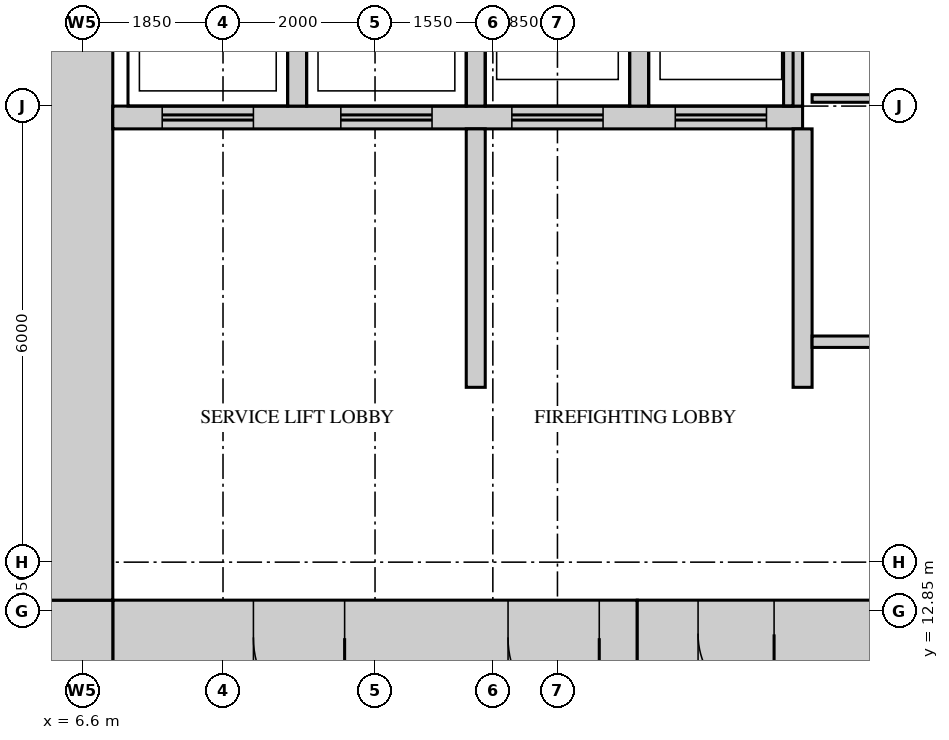
"""IFC4 building model, lengths in metres.
Left out: names, types, materials, properties, quantities, classifications, styles, units other than length and angle.
Written with IfcOpenShell. Run it as: python <this file> out.ifc"""

import sys

from ifc_helpers import new_model, si_unit, direction, frame, frame_2d, origin, place, context, subcontext, project, spatial, rectangle, extrude, source, transform, mapped, element, fill, save


model = new_model("IFC4")
c1 = context("Model", 3, precision=1e-05, world=origin(), true_north=direction((0.0, 1.0)))
c2 = subcontext(c1, "Body", "Model", "MODEL_VIEW")
j1 = project(units=[si_unit("LENGTHUNIT", "METRE"), si_unit("PLANEANGLEUNIT", "RADIAN")], contexts=[c1])
p1 = place(None, origin())
s1 = spatial("IfcSite", under=j1, at=p1, CompositionType="ELEMENT")
p2 = place(p1, origin())
s2 = spatial("IfcBuilding", under=s1, at=p2, CompositionType="ELEMENT")
p3 = place(p2, frame((0.0, 0.0, 136.7)))
s3 = spatial("IfcBuildingStorey", under=s2, at=p3, CompositionType="ELEMENT", Elevation=136.7)
m1 = source(origin(), c2, "Body", "SweptSolid", [
    extrude(rectangle(XDim=6.9, YDim=1.0, at=frame_2d((3.45, 0.0))), origin(), (0.0, 0.0, 1.0), 4.1),
])
p4 = place(p3, frame((7.0, 12.5, 0.0), z_axis=(0.0, 0.0, 1.0), x_axis=(1.0, 0.0, 0.0)))
e1 = element("IfcWall", 1, at=p4, inside=s3, PredefinedType="SHEAR", context=c2, shape_type="MappedRepresentation", body=[
    mapped(m1, transform((0.0, 0.0, 0.0))),
])
m2 = source(origin(), c2, "Body", "SweptSolid", [
    extrude(rectangle(XDim=1.2, YDim=2.1, at=frame_2d((0.6, 1.05))), frame((0.0, 0.51, 0.0), z_axis=(0.0, -1.0, 0.0), x_axis=(1.0, 0.0, 0.0)), (0.0, 0.0, 1.0), 1.02),
])
p5 = place(p4, frame((5.2, 0.0, 0.0)))
e2 = element("IfcOpeningElement", 2, at=p5, cuts=e1, PredefinedType="OPENING", context=c2, shape_type="MappedRepresentation", body=[
    mapped(m2, transform((0.0, 0.0, 0.0))),
])
p6 = place(p4, frame((1.85, 0.0, 0.0)))
e3 = element("IfcOpeningElement", 3, at=p6, cuts=e1, PredefinedType="OPENING", context=c2, shape_type="MappedRepresentation", body=[
    mapped(m2, transform((0.0, 0.0, 0.0))),
])
m3 = source(origin(), c2, "Body", "SweptSolid", [
    extrude(rectangle(XDim=7.2, YDim=0.9, at=frame_2d((3.6, 0.0))), origin(), (0.0, 0.0, 1.0), 4.1),
])
p7 = place(p3, frame((13.9, 12.55, 0.0), z_axis=(0.0, 0.0, 1.0), x_axis=(1.0, 0.0, 0.0)))
e4 = element("IfcWall", 4, at=p7, inside=s3, PredefinedType="SHEAR", context=c2, shape_type="MappedRepresentation", body=[
    mapped(m3, transform((0.0, 0.0, 0.0))),
])
m4 = source(origin(), c2, "Body", "SweptSolid", [
    extrude(rectangle(XDim=1.0, YDim=2.1, at=frame_2d((0.5, 1.05))), frame((0.0, 0.46, 0.0), z_axis=(0.0, -1.0, 0.0), x_axis=(1.0, 0.0, 0.0)), (0.0, 0.0, 1.0), 0.92),
])
p8 = place(p7, frame((0.8, 0.0, 0.0)))
e5 = element("IfcOpeningElement", 5, at=p8, cuts=e4, PredefinedType="OPENING", context=c2, shape_type="MappedRepresentation", body=[
    mapped(m4, transform((0.0, 0.0, 0.0))),
])
m5 = source(origin(), c2, "Body", "SweptSolid", [
    extrude(rectangle(XDim=1.0, YDim=1.0, at=frame_2d((0.5, 0.0))), origin(), (0.0, 0.0, 1.0), 4.1),
])
p9 = place(p3, frame((6.0, 12.5, 0.0), z_axis=(0.0, 0.0, 1.0), x_axis=(1.0, 0.0, 0.0)))
e6 = element("IfcWall", 6, at=p9, inside=s3, PredefinedType="SHEAR", context=c2, shape_type="MappedRepresentation", body=[
    mapped(m5, transform((0.0, 0.0, 0.0))),
])
m6 = source(origin(), c2, "Body", "SweptSolid", [
    extrude(rectangle(XDim=28.0, YDim=1.0, at=frame_2d((14.0, 0.0))), origin(), (0.0, 0.0, 1.0), 4.1),
])
p10 = place(p3, frame((6.5, 13.0, 0.0), z_axis=(0.0, 0.0, 1.0), x_axis=(0.0, 1.0, 0.0)))
e7 = element("IfcWall", 7, at=p10, inside=s3, PredefinedType="SHEAR", context=c2, shape_type="MappedRepresentation", body=[
    mapped(m6, transform((0.0, 0.0, 0.0))),
])
m7 = source(origin(), c2, "Body", "SweptSolid", [
    extrude(rectangle(XDim=9.075, YDim=0.3, at=frame_2d((4.538, 0.0))), origin(), (0.0, 0.0, 1.0), 4.1),
])
p11 = place(p3, frame((7.0, 19.35, 0.0), z_axis=(0.0, 0.0, 1.0), x_axis=(1.0, 0.0, 0.0)))
e8 = element("IfcWall", 8, at=p11, inside=s3, PredefinedType="STANDARD", context=c2, shape_type="MappedRepresentation", body=[
    mapped(m7, transform((0.0, 0.0, 0.0))),
])
m8 = source(origin(), c2, "Body", "SweptSolid", [
    extrude(rectangle(XDim=1.2, YDim=2.1, at=frame_2d((0.6, 1.05))), frame((0.0, 0.16, 0.0), z_axis=(0.0, -1.0, 0.0), x_axis=(1.0, 0.0, 0.0)), (0.0, 0.0, 1.0), 0.32),
])
p12 = place(p11, frame((0.65, 0.0, 0.0)))
e9 = element("IfcOpeningElement", 9, at=p12, cuts=e8, PredefinedType="OPENING", context=c2, shape_type="MappedRepresentation", body=[
    mapped(m8, transform((0.0, 0.0, 0.0))),
])
p13 = place(p11, frame((3.0, 0.0, 0.0)))
e10 = element("IfcOpeningElement", 10, at=p13, cuts=e8, PredefinedType="OPENING", context=c2, shape_type="MappedRepresentation", body=[
    mapped(m8, transform((0.0, 0.0, 0.0))),
])
p14 = place(p11, frame((5.25, 0.0, 0.0)))
e11 = element("IfcOpeningElement", 11, at=p14, cuts=e8, PredefinedType="OPENING", context=c2, shape_type="MappedRepresentation", body=[
    mapped(m8, transform((0.0, 0.0, 0.0))),
])
p15 = place(p11, frame((7.4, 0.0, 0.0)))
e12 = element("IfcOpeningElement", 12, at=p15, cuts=e8, PredefinedType="OPENING", context=c2, shape_type="MappedRepresentation", body=[
    mapped(m8, transform((0.0, 0.0, 0.0))),
])
m9 = source(origin(), c2, "Body", "SweptSolid", [
    extrude(rectangle(XDim=3.1, YDim=0.25, at=frame_2d((1.55, 0.0))), origin(), (0.0, 0.0, 1.0), 4.1),
])
for number, where, z_axis, x_axis in (
    (13, (9.425, 19.5, 0.0), (0.0, 0.0, 1.0), (0.0, 1.0, 0.0)),
    (14, (11.775, 19.5, 0.0), (0.0, 0.0, 1.0), (0.0, 1.0, 0.0)),
    (15, (13.925, 19.5, 0.0), (0.0, 0.0, 1.0), (0.0, 1.0, 0.0)),
    (16, (15.95, 19.5, 0.0), (0.0, 0.0, 1.0), (0.0, 1.0, 0.0)),
):
    element("IfcWall", number, at=place(p3, frame(where, z_axis=z_axis, x_axis=x_axis)), inside=s3, PredefinedType="STANDARD", context=c2, shape_type="MappedRepresentation", body=[
        mapped(m9, transform((0.0, 0.0, 0.0))),
    ])
m10 = source(origin(), c2, "Body", "SweptSolid", [
    extrude(rectangle(XDim=3.4, YDim=0.25, at=frame_2d((1.7, 0.0))), origin(), (0.0, 0.0, 1.0), 4.1),
])
for number, where, z_axis, x_axis in (
    (17, (16.075, 15.8, 0.0), (0.0, 0.0, 1.0), (0.0, 1.0, 0.0)),
    (18, (11.775, 15.8, 0.0), (0.0, 0.0, 1.0), (0.0, 1.0, 0.0)),
):
    element("IfcWall", number, at=place(p3, frame(where, z_axis=z_axis, x_axis=x_axis)), inside=s3, PredefinedType="STANDARD", context=c2, shape_type="MappedRepresentation", body=[
        mapped(m10, transform((0.0, 0.0, 0.0))),
    ])
m11 = source(origin(), c2, "Body", "SweptSolid", [
    extrude(rectangle(XDim=6.6, YDim=0.15, at=frame_2d((3.3, 0.0))), origin(), (0.0, 0.0, 1.0), 4.2),
])
p16 = place(p3, frame((16.2, 16.4, 0.0), z_axis=(0.0, 0.0, 1.0), x_axis=(1.0, 0.0, 0.0)))
e19 = element("IfcWall", 19, at=p16, inside=s3, PredefinedType="PARTITIONING", context=c2, shape_type="MappedRepresentation", body=[
    mapped(m11, transform((0.0, 0.0, 0.0))),
])
m12 = source(origin(), c2, "Body", "SweptSolid", [
    extrude(rectangle(XDim=6.6, YDim=0.1, at=frame_2d((3.3, 0.0))), origin(), (0.0, 0.0, 1.0), 4.2),
])
p17 = place(p3, frame((16.2, 19.6, 0.0), z_axis=(0.0, 0.0, 1.0), x_axis=(1.0, 0.0, 0.0)))
e20 = element("IfcWall", 20, at=p17, inside=s3, PredefinedType="PARTITIONING", context=c2, shape_type="MappedRepresentation", body=[
    mapped(m12, transform((0.0, 0.0, 0.0))),
])
m13 = source(origin(), c2, "Body", "SweptSolid", [
    extrude(rectangle(XDim=1.2, YDim=2.1, at=frame_2d((0.6, 1.05))), frame((0.0, 0.45, 0.0), z_axis=(0.0, -1.0, 0.0), x_axis=(1.0, 0.0, 0.0)), (0.0, 0.0, 1.0), 0.9),
])
p18 = place(p5, origin())
e21 = element("IfcDoor", 21, at=p18, inside=s3, OperationType="SINGLE_SWING_RIGHT", PredefinedType="DOOR", context=c2, shape_type="MappedRepresentation", body=[
    mapped(m13, transform((0.0, 0.0, 0.0))),
])
fill(e2, e21)
p19 = place(p6, origin())
e22 = element("IfcDoor", 22, at=p19, inside=s3, OperationType="SINGLE_SWING_RIGHT", PredefinedType="DOOR", context=c2, shape_type="MappedRepresentation", body=[
    mapped(m13, transform((0.0, 0.0, 0.0))),
])
fill(e3, e22)
m14 = source(origin(), c2, "Body", "SweptSolid", [
    extrude(rectangle(XDim=1.0, YDim=2.1, at=frame_2d((0.5, 1.05))), frame((0.0, 0.4, 0.0), z_axis=(0.0, -1.0, 0.0), x_axis=(1.0, 0.0, 0.0)), (0.0, 0.0, 1.0), 0.8),
])
p20 = place(p8, origin())
e23 = element("IfcDoor", 23, at=p20, inside=s3, OperationType="SINGLE_SWING_RIGHT", PredefinedType="DOOR", context=c2, shape_type="MappedRepresentation", body=[
    mapped(m14, transform((0.0, 0.0, 0.0))),
])
fill(e5, e23)
m15 = source(origin(), c2, "Body", "SweptSolid", [
    extrude(rectangle(XDim=1.2, YDim=2.1, at=frame_2d((0.6, 1.05))), frame((0.0, 0.025, 0.0), z_axis=(0.0, -1.0, 0.0), x_axis=(1.0, 0.0, 0.0)), (0.0, 0.0, 1.0), 0.05),
])
p21 = place(p12, origin())
e24 = element("IfcDoor", 24, at=p21, inside=s3, OperationType="DOUBLE_DOOR_SLIDING", PredefinedType="DOOR", context=c2, shape_type="MappedRepresentation", body=[
    mapped(m15, transform((0.0, 0.0, 0.0))),
])
fill(e9, e24)
p22 = place(p13, origin())
e25 = element("IfcDoor", 25, at=p22, inside=s3, OperationType="DOUBLE_DOOR_SLIDING", PredefinedType="DOOR", context=c2, shape_type="MappedRepresentation", body=[
    mapped(m15, transform((0.0, 0.0, 0.0))),
])
fill(e10, e25)
p23 = place(p14, origin())
e26 = element("IfcDoor", 26, at=p23, inside=s3, OperationType="DOUBLE_DOOR_SLIDING", PredefinedType="DOOR", context=c2, shape_type="MappedRepresentation", body=[
    mapped(m15, transform((0.0, 0.0, 0.0))),
])
fill(e11, e26)
p24 = place(p15, origin())
e27 = element("IfcDoor", 27, at=p24, inside=s3, OperationType="DOUBLE_DOOR_SLIDING", PredefinedType="DOOR", context=c2, shape_type="MappedRepresentation", body=[
    mapped(m15, transform((0.0, 0.0, 0.0))),
])
fill(e12, e27)
save(model, sys.argv[1])
